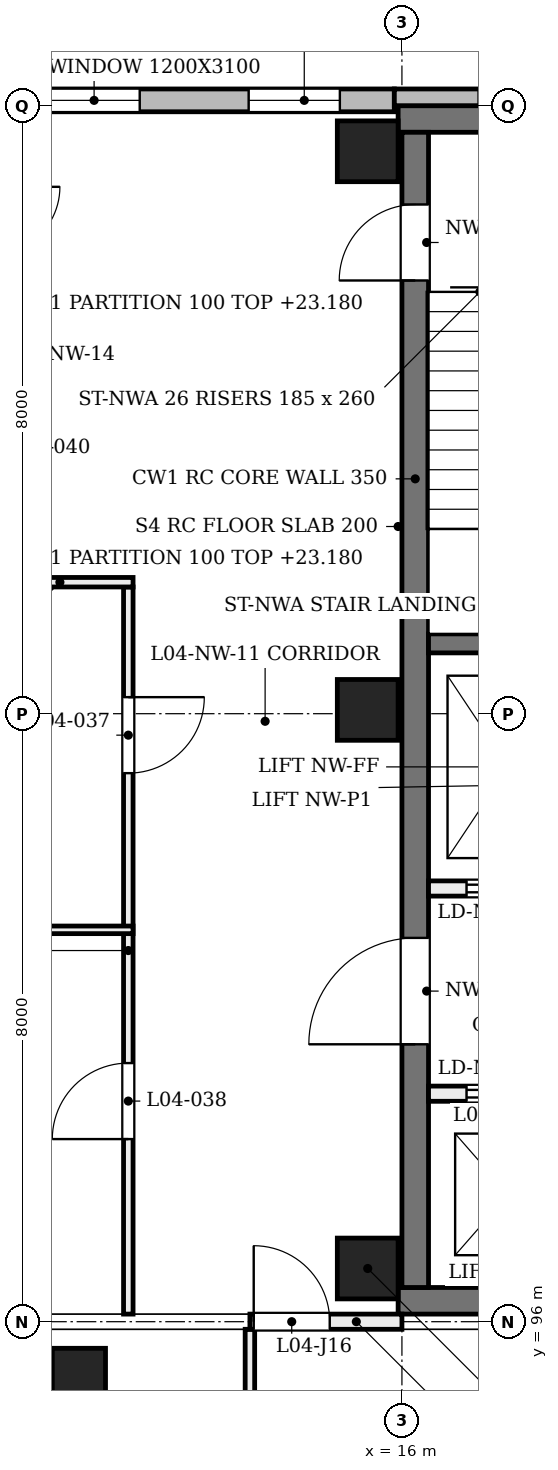
"""IFC4 building model, lengths in metres.
Left out: names, types, materials, properties, quantities, classifications, styles, units other than length and angle.
Written with IfcOpenShell. Run it as: python <this file> out.ifc"""

import sys

from ifc_helpers import new_model, si_unit, direction, frame, frame_2d, origin, origin_2d, place, context, subcontext, project, spatial, rectangle, extrude, element, fill, save


model = new_model("IFC4")
c1 = context("Model", 3, precision=1e-05, world=origin(), true_north=direction((0.0, 1.0)))
c2 = subcontext(c1, "Body", "Model", "MODEL_VIEW")
j1 = project(units=[si_unit("LENGTHUNIT", "METRE"), si_unit("PLANEANGLEUNIT", "RADIAN")], contexts=[c1])
p1 = place(None, origin())
s1 = spatial("IfcSite", under=j1, at=p1, CompositionType="ELEMENT")
p2 = place(p1, origin())
s2 = spatial("IfcBuilding", under=s1, at=p2, CompositionType="ELEMENT")
p3 = place(p2, frame((0.0, 0.0, 19.2)))
s3 = spatial("IfcBuildingStorey", under=s2, at=p3, CompositionType="ELEMENT", Elevation=19.2)
for number, where, z_axis, x_axis in (
    (1, (15.95, 96.275, 0.0), (0.0, 0.0, 1.0), (1.0, 0.0, 0.0)),
    (2, (15.95, 111.825, 0.0), (0.0, 0.0, 1.0), (1.0, 0.0, 0.0)),
):
    element("IfcWall", number, at=place(p3, frame(where, z_axis=z_axis, x_axis=x_axis)), inside=s3, PredefinedType="SHEAR", context=c2, shape_type="SweptSolid", body=[
        extrude(rectangle(XDim=7.95, YDim=0.35, at=frame_2d((3.975, 0.0))), origin(), (0.0, 0.0, 1.0), 4.58),
    ])
p4 = place(p3, frame((16.175, 96.45, 0.0), z_axis=(0.0, 0.0, 1.0), x_axis=(0.0, 1.0, 0.0)))
e3 = element("IfcWall", 3, at=p4, inside=s3, PredefinedType="SHEAR", context=c2, shape_type="SweptSolid", body=[
    extrude(rectangle(XDim=15.2, YDim=0.35, at=frame_2d((7.6, 0.0))), origin(), (0.0, 0.0, 1.0), 4.58),
])
p5 = place(p4, frame((13.25, 0.0, 0.0)))
e4 = element("IfcOpeningElement", 4, at=p5, cuts=e3, PredefinedType="OPENING", context=c2, shape_type="SweptSolid", body=[
    extrude(rectangle(XDim=1.0, YDim=2.1, at=frame_2d((0.5, 1.05))), frame((0.0, 0.185, 0.0), z_axis=(0.0, -1.0, 0.0), x_axis=(1.0, 0.0, 0.0)), (0.0, 0.0, 1.0), 0.37),
])
p6 = place(p4, frame((3.2, 0.0, 0.0)))
e5 = element("IfcOpeningElement", 5, at=p6, cuts=e3, PredefinedType="OPENING", context=c2, shape_type="SweptSolid", body=[
    extrude(rectangle(XDim=1.4, YDim=2.1, at=frame_2d((0.7, 1.05))), frame((0.0, 0.185, 0.0), z_axis=(0.0, -1.0, 0.0), x_axis=(1.0, 0.0, 0.0)), (0.0, 0.0, 1.0), 0.37),
])
for number, where, z_axis, x_axis in (
    (6, (15.55, 96.7, 0.0), (0.0, 0.0, 1.0), (1.0, 0.0, 0.0)),
    (7, (15.55, 104.05, 0.0), (0.0, 0.0, 1.0), (1.0, 0.0, 0.0)),
    (8, (15.55, 111.4, 0.0), (0.0, 0.0, 1.0), (1.0, 0.0, 0.0)),
):
    element("IfcColumn", number, at=place(p3, frame(where, z_axis=z_axis, x_axis=x_axis)), inside=s3, PredefinedType="COLUMN", context=c2, shape_type="SweptSolid", body=[
        extrude(rectangle(XDim=0.8, YDim=0.8, at=origin_2d()), origin(), (0.0, 0.0, 1.0), 4.8),
    ])
p7 = place(p3, frame((12.0, 95.3, 0.0), z_axis=(-0.203952265704, 0.0, 0.978980833987), x_axis=(0.0, -1.0, 0.0)))
e9 = element("IfcColumn", 9, at=p7, inside=s3, PredefinedType="COLUMN", context=c2, shape_type="SweptSolid", body=[
    extrude(rectangle(XDim=0.7, YDim=0.7, at=origin_2d()), origin(), (0.0, 0.0, 1.0), 4.903),
])
p8 = place(p3, frame((8.0, 112.07, 0.0), z_axis=(0.0, 0.0, 1.0), x_axis=(1.0, 0.0, 0.0)))
e10 = element("IfcWall", 10, at=p8, inside=s3, PredefinedType="SOLIDWALL", context=c2, shape_type="SweptSolid", body=[
    extrude(rectangle(XDim=7.9, YDim=0.3, at=frame_2d((3.95, 0.0))), origin(), (0.0, 0.0, 1.0), 3.9),
])
p9 = place(p8, frame((0.717, 0.0, 0.75)))
e11 = element("IfcOpeningElement", 11, at=p9, cuts=e10, PredefinedType="OPENING", context=c2, shape_type="SweptSolid", body=[
    extrude(rectangle(XDim=1.2, YDim=3.1, at=frame_2d((0.6, 1.55))), frame((0.0, 0.16, 0.0), z_axis=(0.0, -1.0, 0.0), x_axis=(1.0, 0.0, 0.0)), (0.0, 0.0, 1.0), 0.32),
])
p10 = place(p8, frame((3.35, 0.0, 0.75)))
e12 = element("IfcOpeningElement", 12, at=p10, cuts=e10, PredefinedType="OPENING", context=c2, shape_type="SweptSolid", body=[
    extrude(rectangle(XDim=1.2, YDim=3.1, at=frame_2d((0.6, 1.55))), frame((0.0, 0.16, 0.0), z_axis=(0.0, -1.0, 0.0), x_axis=(1.0, 0.0, 0.0)), (0.0, 0.0, 1.0), 0.32),
])
p11 = place(p8, frame((5.983, 0.0, 0.75)))
e13 = element("IfcOpeningElement", 13, at=p11, cuts=e10, PredefinedType="OPENING", context=c2, shape_type="SweptSolid", body=[
    extrude(rectangle(XDim=1.2, YDim=3.1, at=frame_2d((0.6, 1.55))), frame((0.0, 0.16, 0.0), z_axis=(0.0, -1.0, 0.0), x_axis=(1.0, 0.0, 0.0)), (0.0, 0.0, 1.0), 0.32),
])
p12 = place(p3, frame((15.9, 112.11, 0.0), z_axis=(0.0, 0.0, 1.0), x_axis=(1.0, 0.0, 0.0)))
e14 = element("IfcWall", 14, at=p12, inside=s3, PredefinedType="SOLIDWALL", context=c2, shape_type="SweptSolid", body=[
    extrude(rectangle(XDim=8.2, YDim=0.22, at=frame_2d((4.1, 0.0))), origin(), (0.0, 0.0, 1.0), 3.9),
])
p13 = place(p12, frame((1.108, 0.0, 0.9)))
e15 = element("IfcOpeningElement", 15, at=p13, cuts=e14, PredefinedType="OPENING", context=c2, shape_type="SweptSolid", body=[
    extrude(rectangle(XDim=0.45, YDim=2.6, at=frame_2d((0.225, 1.3))), frame((0.0, 0.12, 0.0), z_axis=(0.0, -1.0, 0.0), x_axis=(1.0, 0.0, 0.0)), (0.0, 0.0, 1.0), 0.24),
])
p14 = place(p12, frame((3.775, 0.0, 0.9)))
e16 = element("IfcOpeningElement", 16, at=p14, cuts=e14, PredefinedType="OPENING", context=c2, shape_type="SweptSolid", body=[
    extrude(rectangle(XDim=0.45, YDim=2.6, at=frame_2d((0.225, 1.3))), frame((0.0, 0.12, 0.0), z_axis=(0.0, -1.0, 0.0), x_axis=(1.0, 0.0, 0.0)), (0.0, 0.0, 1.0), 0.24),
])
p15 = place(p12, frame((6.442, 0.0, 0.9)))
e17 = element("IfcOpeningElement", 17, at=p15, cuts=e14, PredefinedType="OPENING", context=c2, shape_type="SweptSolid", body=[
    extrude(rectangle(XDim=0.45, YDim=2.6, at=frame_2d((0.225, 1.3))), frame((0.0, 0.12, 0.0), z_axis=(0.0, -1.0, 0.0), x_axis=(1.0, 0.0, 0.0)), (0.0, 0.0, 1.0), 0.24),
])
p16 = place(p3, frame((16.35, 104.925, 0.0), z_axis=(0.0, 0.0, 1.0), x_axis=(1.0, 0.0, 0.0)))
e18 = element("IfcWall", 18, at=p16, inside=s3, PredefinedType="SOLIDWALL", context=c2, shape_type="SweptSolid", body=[
    extrude(rectangle(XDim=3.1, YDim=0.25, at=frame_2d((1.55, 0.0))), origin(), (0.0, 0.0, 1.0), 4.55),
])
p17 = place(p3, frame((16.35, 101.7, 0.0), z_axis=(0.0, 0.0, 1.0), x_axis=(1.0, 0.0, 0.0)))
e19 = element("IfcWall", 19, at=p17, inside=s3, PredefinedType="SOLIDWALL", context=c2, shape_type="SweptSolid", body=[
    extrude(rectangle(XDim=7.2, YDim=0.2, at=frame_2d((3.6, 0.0))), origin(), (0.0, 0.0, 1.0), 4.55),
])
p18 = place(p17, frame((0.5, 0.0, 0.0)))
e20 = element("IfcOpeningElement", 20, at=p18, cuts=e19, PredefinedType="OPENING", context=c2, shape_type="SweptSolid", body=[
    extrude(rectangle(XDim=1.1, YDim=2.1, at=frame_2d((0.55, 1.05))), frame((0.0, 0.11, 0.0), z_axis=(0.0, -1.0, 0.0), x_axis=(1.0, 0.0, 0.0)), (0.0, 0.0, 1.0), 0.22),
])
p19 = place(p17, frame((5.6, 0.0, 0.0)))
e21 = element("IfcOpeningElement", 21, at=p19, cuts=e19, PredefinedType="OPENING", context=c2, shape_type="SweptSolid", body=[
    extrude(rectangle(XDim=1.1, YDim=2.1, at=frame_2d((0.55, 1.05))), frame((0.0, 0.11, 0.0), z_axis=(0.0, -1.0, 0.0), x_axis=(1.0, 0.0, 0.0)), (0.0, 0.0, 1.0), 0.22),
])
p20 = place(p17, frame((3.1, 0.0, 0.0)))
e22 = element("IfcOpeningElement", 22, at=p20, cuts=e19, PredefinedType="OPENING", context=c2, shape_type="SweptSolid", body=[
    extrude(rectangle(XDim=1.0, YDim=2.1, at=frame_2d((0.5, 1.05))), frame((0.0, 0.11, 0.0), z_axis=(0.0, -1.0, 0.0), x_axis=(1.0, 0.0, 0.0)), (0.0, 0.0, 1.0), 0.22),
])
p21 = place(p3, frame((16.35, 99.0, 0.0), z_axis=(0.0, 0.0, 1.0), x_axis=(1.0, 0.0, 0.0)))
e23 = element("IfcWall", 23, at=p21, inside=s3, PredefinedType="SOLIDWALL", context=c2, shape_type="SweptSolid", body=[
    extrude(rectangle(XDim=7.2, YDim=0.2, at=frame_2d((3.6, 0.0))), origin(), (0.0, 0.0, 1.0), 4.55),
])
p22 = place(p21, frame((0.5, 0.0, 0.0)))
e24 = element("IfcOpeningElement", 24, at=p22, cuts=e23, PredefinedType="OPENING", context=c2, shape_type="SweptSolid", body=[
    extrude(rectangle(XDim=1.1, YDim=2.1, at=frame_2d((0.55, 1.05))), frame((0.0, 0.11, 0.0), z_axis=(0.0, -1.0, 0.0), x_axis=(1.0, 0.0, 0.0)), (0.0, 0.0, 1.0), 0.22),
])
p23 = place(p21, frame((5.6, 0.0, 0.0)))
e25 = element("IfcOpeningElement", 25, at=p23, cuts=e23, PredefinedType="OPENING", context=c2, shape_type="SweptSolid", body=[
    extrude(rectangle(XDim=1.1, YDim=2.1, at=frame_2d((0.55, 1.05))), frame((0.0, 0.11, 0.0), z_axis=(0.0, -1.0, 0.0), x_axis=(1.0, 0.0, 0.0)), (0.0, 0.0, 1.0), 0.22),
])
p24 = place(p21, frame((3.1, 0.0, 0.0)))
e26 = element("IfcOpeningElement", 26, at=p24, cuts=e23, PredefinedType="OPENING", context=c2, shape_type="SweptSolid", body=[
    extrude(rectangle(XDim=1.0, YDim=2.1, at=frame_2d((0.5, 1.05))), frame((0.0, 0.11, 0.0), z_axis=(0.0, -1.0, 0.0), x_axis=(1.0, 0.0, 0.0)), (0.0, 0.0, 1.0), 0.22),
])
p25 = place(p3, frame((14.0, 91.805, 0.0), z_axis=(0.0, 0.0, 1.0), x_axis=(0.0, 1.0, 0.0)))
e27 = element("IfcWall", 27, at=p25, inside=s3, PredefinedType="PARTITIONING", context=c2, shape_type="SweptSolid", body=[
    extrude(rectangle(XDim=4.095, YDim=0.125, at=frame_2d((2.047, 0.0))), origin(), (0.0, 0.0, 1.0), 3.88),
])
p26 = place(p25, frame((1.745, 0.0, 0.0)))
e28 = element("IfcOpeningElement", 28, at=p26, cuts=e27, PredefinedType="OPENING", context=c2, shape_type="SweptSolid", body=[
    extrude(rectangle(XDim=1.15, YDim=2.1, at=frame_2d((0.575, 1.05))), frame((0.0, 0.073, 0.0), z_axis=(0.0, -1.0, 0.0), x_axis=(1.0, 0.0, 0.0)), (0.0, 0.0, 1.0), 0.145),
])
p27 = place(p3, frame((12.4, 96.1, 0.0), z_axis=(0.0, 0.0, 1.0), x_axis=(0.0, 1.0, 0.0)))
e29 = element("IfcWall", 29, at=p27, inside=s3, PredefinedType="PARTITIONING", context=c2, shape_type="SweptSolid", body=[
    extrude(rectangle(XDim=9.567, YDim=0.125, at=frame_2d((4.783, 0.0))), origin(), (0.0, 0.0, 1.0), 3.88),
])
p28 = place(p27, frame((7.118, 0.0, 0.0)))
e30 = element("IfcOpeningElement", 30, at=p28, cuts=e29, PredefinedType="OPENING", context=c2, shape_type="SweptSolid", body=[
    extrude(rectangle(XDim=1.0, YDim=2.1, at=frame_2d((0.5, 1.05))), frame((0.0, 0.073, 0.0), z_axis=(0.0, -1.0, 0.0), x_axis=(1.0, 0.0, 0.0)), (0.0, 0.0, 1.0), 0.145),
])
p29 = place(p27, frame((2.303, 0.0, 0.0)))
e31 = element("IfcOpeningElement", 31, at=p29, cuts=e29, PredefinedType="OPENING", context=c2, shape_type="SweptSolid", body=[
    extrude(rectangle(XDim=1.0, YDim=2.1, at=frame_2d((0.5, 1.05))), frame((0.0, 0.073, 0.0), z_axis=(0.0, -1.0, 0.0), x_axis=(1.0, 0.0, 0.0)), (0.0, 0.0, 1.0), 0.145),
])
p30 = place(p3, frame((8.08, 101.156, 0.0), z_axis=(0.0, 0.0, 1.0), x_axis=(1.0, 0.0, 0.0)))
e32 = element("IfcWall", 32, at=p30, inside=s3, PredefinedType="PARTITIONING", context=c2, shape_type="SweptSolid", body=[
    extrude(rectangle(XDim=4.382, YDim=0.1, at=frame_2d((2.191, 0.0))), origin(), (0.0, 0.0, 1.0), 3.88),
])
p31 = place(p3, frame((10.538, 105.73, 0.0), z_axis=(0.0, 0.0, 1.0), x_axis=(1.0, 0.0, 0.0)))
e33 = element("IfcWall", 33, at=p31, inside=s3, PredefinedType="PARTITIONING", context=c2, shape_type="SweptSolid", body=[
    extrude(rectangle(XDim=1.925, YDim=0.125, at=frame_2d((0.962, 0.0))), origin(), (0.0, 0.0, 1.0), 4.56),
])
p32 = place(p3, frame((14.0, 96.0, 0.0), z_axis=(0.0, 0.0, 1.0), x_axis=(1.0, 0.0, 0.0)))
e34 = element("IfcWall", 34, at=p32, inside=s3, PredefinedType="PARTITIONING", context=c2, shape_type="SweptSolid", body=[
    extrude(rectangle(XDim=2.0, YDim=0.2, at=frame_2d((1.0, 0.0))), origin(), (0.0, 0.0, 1.0), 3.88),
])
p33 = place(p32, frame((0.05, 0.0, 0.0)))
e35 = element("IfcOpeningElement", 35, at=p33, cuts=e34, PredefinedType="OPENING", context=c2, shape_type="SweptSolid", body=[
    extrude(rectangle(XDim=1.0, YDim=2.1, at=frame_2d((0.5, 1.05))), frame((0.0, 0.11, 0.0), z_axis=(0.0, -1.0, 0.0), x_axis=(1.0, 0.0, 0.0)), (0.0, 0.0, 1.0), 0.22),
])
p34 = place(p10, origin())
e36 = element("IfcWindow", 36, at=p34, inside=s3, PartitioningType="SINGLE_PANEL", PredefinedType="WINDOW", context=c2, shape_type="SweptSolid", body=[
    extrude(rectangle(XDim=1.2, YDim=3.1, at=frame_2d((0.6, 1.55))), frame((0.0, 0.03, 0.0), z_axis=(0.0, -1.0, 0.0), x_axis=(1.0, 0.0, 0.0)), (0.0, 0.0, 1.0), 0.06),
])
fill(e12, e36)
p35 = place(p11, origin())
e37 = element("IfcWindow", 37, at=p35, inside=s3, PartitioningType="SINGLE_PANEL", PredefinedType="WINDOW", context=c2, shape_type="SweptSolid", body=[
    extrude(rectangle(XDim=1.2, YDim=3.1, at=frame_2d((0.6, 1.55))), frame((0.0, 0.03, 0.0), z_axis=(0.0, -1.0, 0.0), x_axis=(1.0, 0.0, 0.0)), (0.0, 0.0, 1.0), 0.06),
])
fill(e13, e37)
p36 = place(p5, origin())
e38 = element("IfcDoor", 38, at=p36, inside=s3, OperationType="SINGLE_SWING_LEFT", PredefinedType="DOOR", context=c2, shape_type="SweptSolid", body=[
    extrude(rectangle(XDim=1.0, YDim=2.1, at=frame_2d((0.5, 1.05))), frame((0.0, 0.025, 0.0), z_axis=(0.0, -1.0, 0.0), x_axis=(1.0, 0.0, 0.0)), (0.0, 0.0, 1.0), 0.05),
])
fill(e4, e38)
p37 = place(p18, frame((1.1, 0.0, 0.0), z_axis=(0.0, 0.0, 1.0), x_axis=(-1.0, 0.0, 0.0)))
e39 = element("IfcDoor", 39, at=p37, inside=s3, OperationType="DOUBLE_DOOR_SLIDING", PredefinedType="DOOR", context=c2, shape_type="SweptSolid", body=[
    extrude(rectangle(XDim=1.1, YDim=2.1, at=frame_2d((0.55, 1.05))), frame((0.0, 0.025, 0.0), z_axis=(0.0, -1.0, 0.0), x_axis=(1.0, 0.0, 0.0)), (0.0, 0.0, 1.0), 0.05),
])
fill(e20, e39)
p38 = place(p22, origin())
e40 = element("IfcDoor", 40, at=p38, inside=s3, OperationType="DOUBLE_DOOR_SLIDING", PredefinedType="DOOR", context=c2, shape_type="SweptSolid", body=[
    extrude(rectangle(XDim=1.1, YDim=2.1, at=frame_2d((0.55, 1.05))), frame((0.0, 0.025, 0.0), z_axis=(0.0, -1.0, 0.0), x_axis=(1.0, 0.0, 0.0)), (0.0, 0.0, 1.0), 0.05),
])
fill(e24, e40)
p39 = place(p6, origin())
e41 = element("IfcDoor", 41, at=p39, inside=s3, OperationType="SINGLE_SWING_LEFT", PredefinedType="DOOR", context=c2, shape_type="SweptSolid", body=[
    extrude(rectangle(XDim=1.4, YDim=2.1, at=frame_2d((0.7, 1.05))), frame((0.0, 0.025, 0.0), z_axis=(0.0, -1.0, 0.0), x_axis=(1.0, 0.0, 0.0)), (0.0, 0.0, 1.0), 0.05),
])
fill(e5, e41)
p40 = place(p28, origin())
e42 = element("IfcDoor", 42, at=p40, inside=s3, OperationType="SINGLE_SWING_RIGHT", PredefinedType="DOOR", context=c2, shape_type="SweptSolid", body=[
    extrude(rectangle(XDim=1.0, YDim=2.1, at=frame_2d((0.5, 1.05))), frame((0.0, 0.025, 0.0), z_axis=(0.0, -1.0, 0.0), x_axis=(1.0, 0.0, 0.0)), (0.0, 0.0, 1.0), 0.05),
])
fill(e30, e42)
p41 = place(p29, origin())
e43 = element("IfcDoor", 43, at=p41, inside=s3, OperationType="SINGLE_SWING_LEFT", PredefinedType="DOOR", context=c2, shape_type="SweptSolid", body=[
    extrude(rectangle(XDim=1.0, YDim=2.1, at=frame_2d((0.5, 1.05))), frame((0.0, 0.025, 0.0), z_axis=(0.0, -1.0, 0.0), x_axis=(1.0, 0.0, 0.0)), (0.0, 0.0, 1.0), 0.05),
])
fill(e31, e43)
p42 = place(p33, origin())
e44 = element("IfcDoor", 44, at=p42, inside=s3, OperationType="SINGLE_SWING_LEFT", PredefinedType="DOOR", context=c2, shape_type="SweptSolid", body=[
    extrude(rectangle(XDim=1.0, YDim=2.1, at=frame_2d((0.5, 1.05))), frame((0.0, 0.025, 0.0), z_axis=(0.0, -1.0, 0.0), x_axis=(1.0, 0.0, 0.0)), (0.0, 0.0, 1.0), 0.05),
])
fill(e35, e44)
save(model, sys.argv[1])
